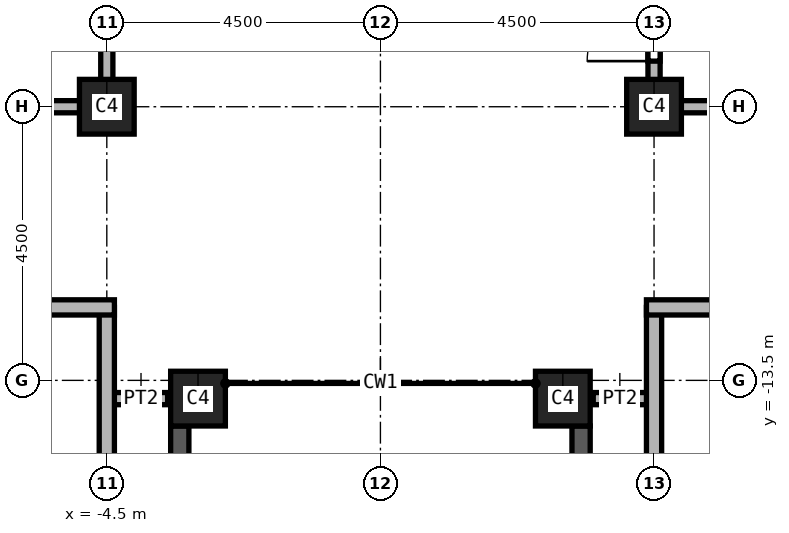
"""IFC4 building model, lengths in metres.
Left out: names, types, materials, properties, quantities, classifications, styles, units other than length and angle.
Written with IfcOpenShell. Run it as: python <this file> out.ifc"""

import sys

from ifc_helpers import new_model, si_unit, direction, frame, frame_2d, origin, origin_2d, place, context, subcontext, project, spatial, rectangle, extrude, element, fill, save


model = new_model("IFC4")
c1 = context("Model", 3, precision=1e-05, world=origin(), true_north=direction((0.0, 1.0)))
c2 = subcontext(c1, "Body", "Model", "MODEL_VIEW")
j1 = project(units=[si_unit("LENGTHUNIT", "METRE"), si_unit("PLANEANGLEUNIT", "RADIAN")], contexts=[c1])
p1 = place(None, origin())
s1 = spatial("IfcSite", under=j1, at=p1, CompositionType="ELEMENT")
p2 = place(p1, origin())
s2 = spatial("IfcBuilding", under=s1, at=p2, CompositionType="ELEMENT")
p3 = place(p2, frame((0.0, 0.0, 220.0)))
s3 = spatial("IfcBuildingStorey", under=s2, at=p3, CompositionType="ELEMENT", Elevation=220.0)
for number, where, z_axis, x_axis in (
    (1, (4.5, -9.0, 0.0), (0.0, 0.0, 1.0), (1.0, 0.0, 0.0)),
    (2, (-4.5, -9.0, 0.0), (0.0, 0.0, 1.0), (1.0, 0.0, 0.0)),
    (3, (3.0, -13.8, 0.0), (0.0, 0.0, 1.0), (1.0, 0.0, 0.0)),
    (4, (-3.0, -13.8, 0.0), (0.0, 0.0, 1.0), (1.0, 0.0, 0.0)),
):
    element("IfcColumn", number, at=place(p3, frame(where, z_axis=z_axis, x_axis=x_axis)), inside=s3, PredefinedType="COLUMN", context=c2, shape_type="SweptSolid", body=[
        extrude(rectangle(XDim=0.9, YDim=0.9, at=origin_2d()), origin(), (0.0, 0.0, 1.0), 3.72),
    ])
p4 = place(p3, frame((-3.3, -22.3, 0.0), z_axis=(0.0, 0.0, 1.0), x_axis=(0.0, 1.0, 0.0)))
e5 = element("IfcWall", 5, at=p4, inside=s3, PredefinedType="SOLIDWALL", context=c2, shape_type="SweptSolid", body=[
    extrude(rectangle(XDim=8.05, YDim=0.3, at=frame_2d((4.025, 0.0))), origin(), (0.0, 0.0, 1.0), 3.12),
])
p5 = place(p4, frame((0.812, 0.0, 0.8)))
e6 = element("IfcOpeningElement", 6, at=p5, cuts=e5, PredefinedType="OPENING", context=c2, shape_type="SweptSolid", body=[
    extrude(rectangle(XDim=2.4, YDim=1.95, at=frame_2d((1.2, 0.975))), frame((0.0, 0.15, 0.0), z_axis=(0.0, -1.0, 0.0), x_axis=(1.0, 0.0, 0.0)), (0.0, 0.0, 1.0), 0.3),
])
p6 = place(p4, frame((4.837, 0.0, 0.8)))
e7 = element("IfcOpeningElement", 7, at=p6, cuts=e5, PredefinedType="OPENING", context=c2, shape_type="SweptSolid", body=[
    extrude(rectangle(XDim=2.4, YDim=1.95, at=frame_2d((1.2, 0.975))), frame((0.0, 0.15, 0.0), z_axis=(0.0, -1.0, 0.0), x_axis=(1.0, 0.0, 0.0)), (0.0, 0.0, 1.0), 0.3),
])
p7 = place(p3, frame((3.3, -14.25, 0.0), z_axis=(0.0, 0.0, 1.0), x_axis=(0.0, -1.0, 0.0)))
e8 = element("IfcWall", 8, at=p7, inside=s3, PredefinedType="SOLIDWALL", context=c2, shape_type="SweptSolid", body=[
    extrude(rectangle(XDim=8.05, YDim=0.3, at=frame_2d((4.025, 0.0))), origin(), (0.0, 0.0, 1.0), 3.12),
])
p8 = place(p7, frame((0.812, 0.0, 0.8)))
e9 = element("IfcOpeningElement", 9, at=p8, cuts=e8, PredefinedType="OPENING", context=c2, shape_type="SweptSolid", body=[
    extrude(rectangle(XDim=2.4, YDim=1.95, at=frame_2d((1.2, 0.975))), frame((0.0, 0.15, 0.0), z_axis=(0.0, -1.0, 0.0), x_axis=(1.0, 0.0, 0.0)), (0.0, 0.0, 1.0), 0.3),
])
p9 = place(p7, frame((4.837, 0.0, 0.8)))
e10 = element("IfcOpeningElement", 10, at=p9, cuts=e8, PredefinedType="OPENING", context=c2, shape_type="SweptSolid", body=[
    extrude(rectangle(XDim=2.4, YDim=1.95, at=frame_2d((1.2, 0.975))), frame((0.0, 0.15, 0.0), z_axis=(0.0, -1.0, 0.0), x_axis=(1.0, 0.0, 0.0)), (0.0, 0.0, 1.0), 0.3),
])
for number, where, z_axis, x_axis in (
    (11, (-3.5, -13.8, 0.0), (0.0, 0.0, 1.0), (-1.0, 0.0, 0.0)),
    (12, (4.5, -13.8, 0.0), (0.0, 0.0, 1.0), (-1.0, 0.0, 0.0)),
):
    element("IfcWall", number, at=place(p3, frame(where, z_axis=z_axis, x_axis=x_axis)), inside=s3, PredefinedType="PARTITIONING", context=c2, shape_type="SweptSolid", body=[
        extrude(rectangle(XDim=1.0, YDim=0.2, at=frame_2d((0.5, 0.0))), origin(), (0.0, 0.0, 1.0), 3.72),
    ])
p10 = place(p3, frame((-4.5, -9.0, 0.0), z_axis=(0.0, 0.0, 1.0), x_axis=(-1.0, 0.0, 0.0)))
e13 = element("IfcWall", 13, at=p10, inside=s3, PredefinedType="SOLIDWALL", context=c2, shape_type="SweptSolid", body=[
    extrude(rectangle(XDim=3.0, YDim=0.2, at=frame_2d((1.5, 0.0))), origin(), (0.0, 0.0, 1.0), 2.958),
])
p11 = place(p3, frame((-4.5, 0.0, 0.0), z_axis=(0.0, 0.0, 1.0), x_axis=(0.0, -1.0, 0.0)))
e14 = element("IfcWall", 14, at=p11, inside=s3, PredefinedType="SOLIDWALL", context=c2, shape_type="SweptSolid", body=[
    extrude(rectangle(XDim=9.1, YDim=0.2, at=frame_2d((4.55, 0.0))), origin(), (0.0, 0.0, 1.0), 2.958),
])
p12 = place(p11, frame((3.25, 0.0, 0.0)))
e15 = element("IfcOpeningElement", 15, at=p12, cuts=e14, PredefinedType="OPENING", context=c2, shape_type="SweptSolid", body=[
    extrude(rectangle(XDim=1.1, YDim=2.1, at=frame_2d((0.55, 1.05))), frame((0.0, 0.1, 0.0), z_axis=(0.0, -1.0, 0.0), x_axis=(1.0, 0.0, 0.0)), (0.0, 0.0, 1.0), 0.2),
])
p13 = place(p11, frame((1.6, 0.0, 0.0)))
e16 = element("IfcOpeningElement", 16, at=p13, cuts=e14, PredefinedType="OPENING", context=c2, shape_type="SweptSolid", body=[
    extrude(rectangle(XDim=1.1, YDim=2.1, at=frame_2d((0.55, 1.05))), frame((0.0, 0.1, 0.0), z_axis=(0.0, -1.0, 0.0), x_axis=(1.0, 0.0, 0.0)), (0.0, 0.0, 1.0), 0.2),
])
p14 = place(p3, frame((4.5, -9.1, 0.0), z_axis=(0.0, 0.0, 1.0), x_axis=(0.0, 1.0, 0.0)))
e17 = element("IfcWall", 17, at=p14, inside=s3, PredefinedType="SOLIDWALL", context=c2, shape_type="SweptSolid", body=[
    extrude(rectangle(XDim=3.1, YDim=0.2, at=frame_2d((1.55, 0.0))), origin(), (0.0, 0.0, 1.0), 2.958),
])
p15 = place(p14, frame((0.85, 0.0, 0.0)))
e18 = element("IfcOpeningElement", 18, at=p15, cuts=e17, PredefinedType="OPENING", context=c2, shape_type="SweptSolid", body=[
    extrude(rectangle(XDim=1.1, YDim=2.1, at=frame_2d((0.55, 1.05))), frame((0.0, 0.1, 0.0), z_axis=(0.0, -1.0, 0.0), x_axis=(1.0, 0.0, 0.0)), (0.0, 0.0, 1.0), 0.2),
])
p16 = place(p3, frame((7.5, -9.0, 0.0), z_axis=(0.0, 0.0, 1.0), x_axis=(-1.0, 0.0, 0.0)))
e19 = element("IfcWall", 19, at=p16, inside=s3, PredefinedType="SOLIDWALL", context=c2, shape_type="SweptSolid", body=[
    extrude(rectangle(XDim=3.0, YDim=0.2, at=frame_2d((1.5, 0.0))), origin(), (0.0, 0.0, 1.0), 2.958),
])
p17 = place(p3, frame((-4.5, -12.3, 0.0), z_axis=(0.0, 0.0, 1.0), x_axis=(0.0, -1.0, 0.0)))
e20 = element("IfcWall", 20, at=p17, inside=s3, PredefinedType="SOLIDWALL", context=c2, shape_type="SweptSolid", body=[
    extrude(rectangle(XDim=4.625, YDim=0.25, at=frame_2d((2.312, 0.0))), origin(), (0.0, 0.0, 1.0), 3.72),
])
p18 = place(p3, frame((-4.375, -12.3, 0.0), z_axis=(0.0, 0.0, 1.0), x_axis=(-1.0, 0.0, 0.0)))
e21 = element("IfcWall", 21, at=p18, inside=s3, PredefinedType="SOLIDWALL", context=c2, shape_type="SweptSolid", body=[
    extrude(rectangle(XDim=9.25, YDim=0.25, at=frame_2d((4.625, 0.0))), origin(), (0.0, 0.0, 1.0), 3.72),
])
p19 = place(p18, frame((7.2, 0.0, 0.0)))
e22 = element("IfcOpeningElement", 22, at=p19, cuts=e21, PredefinedType="OPENING", context=c2, shape_type="SweptSolid", body=[
    extrude(rectangle(XDim=1.2, YDim=2.1, at=frame_2d((0.6, 1.05))), frame((0.0, 0.125, 0.0), z_axis=(0.0, -1.0, 0.0), x_axis=(1.0, 0.0, 0.0)), (0.0, 0.0, 1.0), 0.25),
])
p20 = place(p3, frame((4.5, -16.8, 0.0), z_axis=(0.0, 0.0, 1.0), x_axis=(0.0, 1.0, 0.0)))
e23 = element("IfcWall", 23, at=p20, inside=s3, PredefinedType="SOLIDWALL", context=c2, shape_type="SweptSolid", body=[
    extrude(rectangle(XDim=4.5, YDim=0.25, at=frame_2d((2.25, 0.0))), origin(), (0.0, 0.0, 1.0), 3.72),
])
p21 = place(p3, frame((13.625, -12.3, 0.0), z_axis=(0.0, 0.0, 1.0), x_axis=(-1.0, 0.0, 0.0)))
e24 = element("IfcWall", 24, at=p21, inside=s3, PredefinedType="SOLIDWALL", context=c2, shape_type="SweptSolid", body=[
    extrude(rectangle(XDim=9.25, YDim=0.25, at=frame_2d((4.625, 0.0))), origin(), (0.0, 0.0, 1.0), 3.72),
])
p22 = place(p21, frame((0.85, 0.0, 0.0)))
e25 = element("IfcOpeningElement", 25, at=p22, cuts=e24, PredefinedType="OPENING", context=c2, shape_type="SweptSolid", body=[
    extrude(rectangle(XDim=1.2, YDim=2.1, at=frame_2d((0.6, 1.05))), frame((0.0, 0.125, 0.0), z_axis=(0.0, -1.0, 0.0), x_axis=(1.0, 0.0, 0.0)), (0.0, 0.0, 1.0), 0.25),
])
p23 = place(p15, origin())
e26 = element("IfcDoor", 26, at=p23, inside=s3, OperationType="SINGLE_SWING_LEFT", PredefinedType="DOOR", context=c2, shape_type="SweptSolid", body=[
    extrude(rectangle(XDim=1.1, YDim=2.1, at=frame_2d((0.55, 1.05))), frame((0.0, 0.025, 0.0), z_axis=(0.0, -1.0, 0.0), x_axis=(1.0, 0.0, 0.0)), (0.0, 0.0, 1.0), 0.05),
])
fill(e18, e26)
save(model, sys.argv[1])
